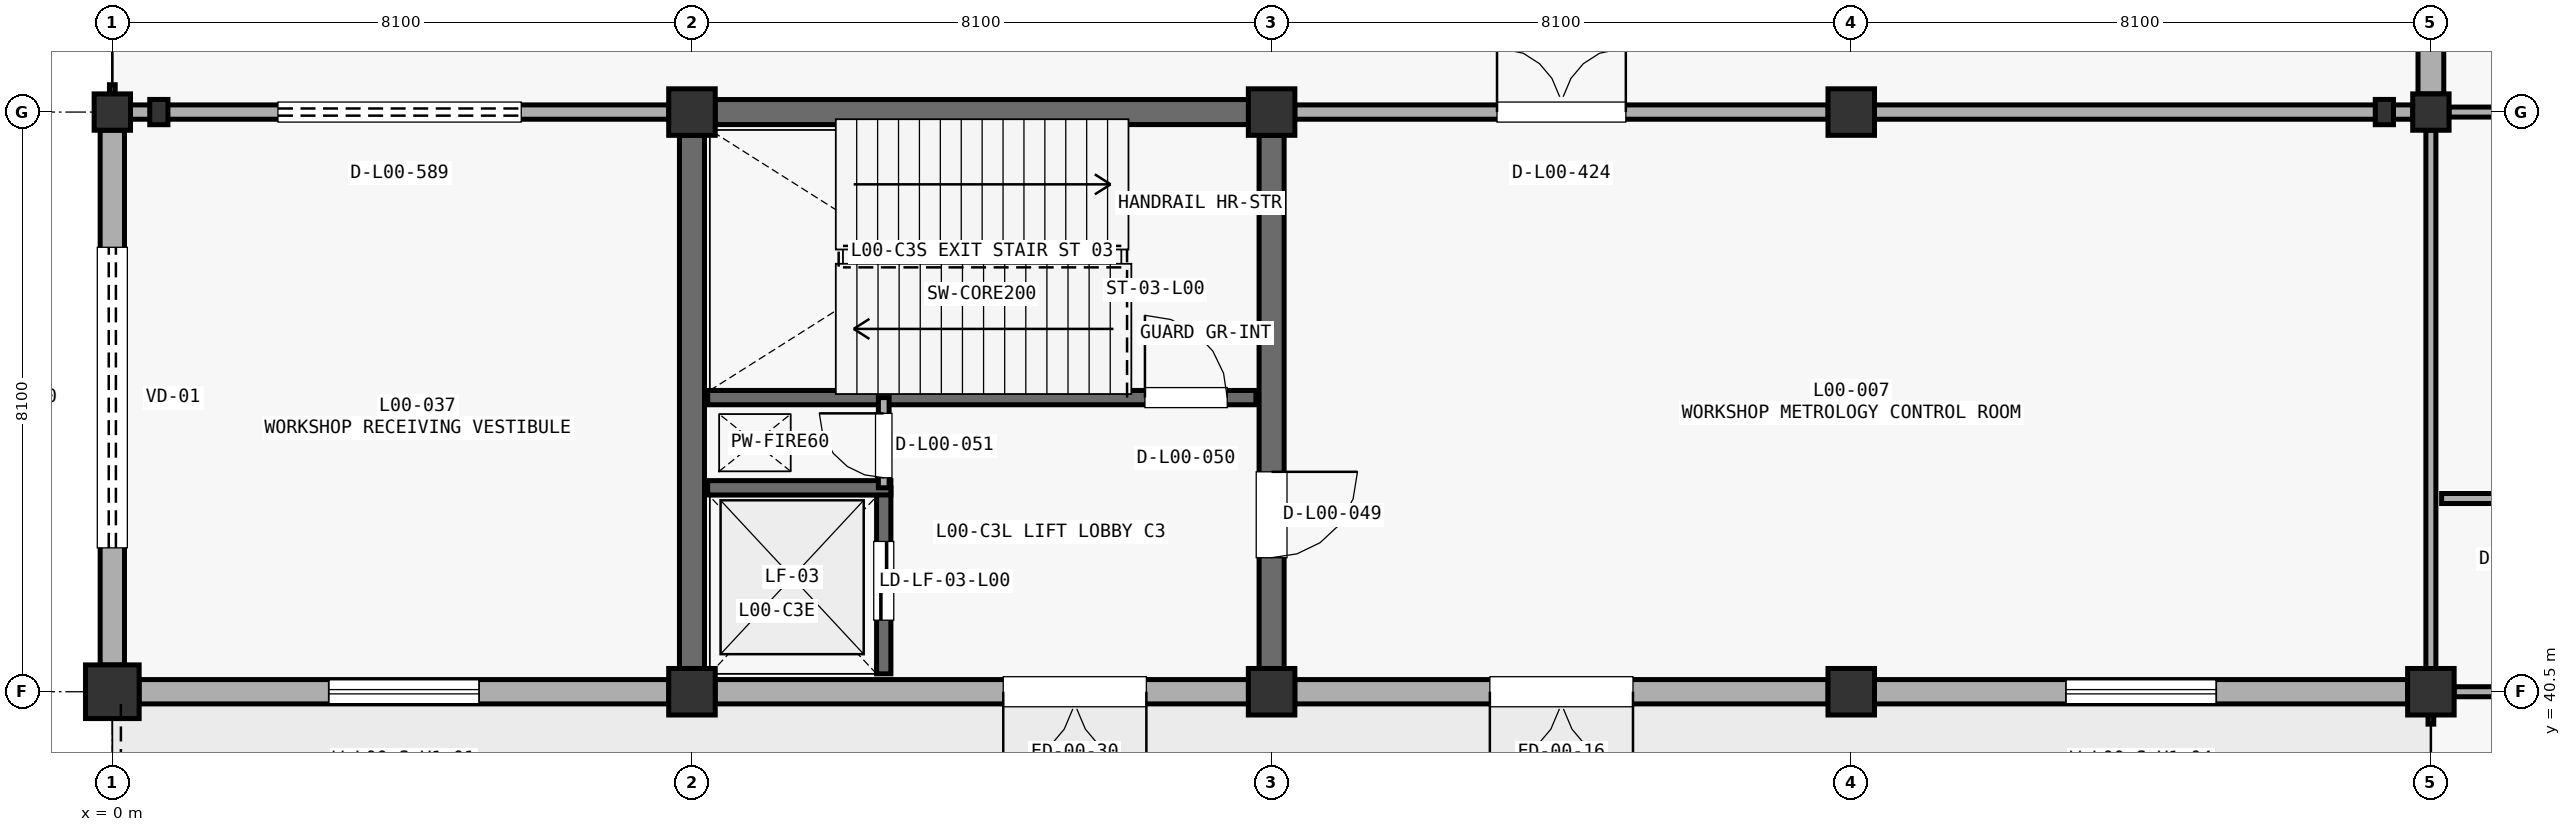
"""IFC4 building model, lengths in metres.
Left out: names, types, materials, properties, quantities, classifications, styles, units other than length and angle.
Written with IfcOpenShell. Run it as: python <this file> out.ifc"""

import sys

from ifc_helpers import new_model, si_unit, direction, frame, frame_2d, origin, origin_2d, place, context, subcontext, project, spatial, rectangle, circle, hollow_circle, i_section, extrude, element, fill, save


model = new_model("IFC4")
c1 = context("Model", 3, precision=1e-05, world=origin(), true_north=direction((0.0, 1.0)))
c2 = subcontext(c1, "Body", "Model", "MODEL_VIEW")
j1 = project(units=[si_unit("LENGTHUNIT", "METRE"), si_unit("PLANEANGLEUNIT", "RADIAN")], contexts=[c1])
p1 = place(None, origin())
s1 = spatial("IfcSite", under=j1, at=p1, CompositionType="ELEMENT")
p2 = place(p1, origin())
s2 = spatial("IfcBuilding", under=s1, at=p2, CompositionType="ELEMENT")
p3 = place(p2, origin())
s3 = spatial("IfcBuildingStorey", under=s2, at=p3, CompositionType="ELEMENT", Elevation=0.0)
p4 = place(p3, frame((0.0, 40.5, 0.0), z_axis=(0.0, 0.0, 1.0), x_axis=(1.0, 0.0, 0.0)))
e1 = element("IfcColumn", 1, at=p4, inside=s3, PredefinedType="COLUMN", context=c2, shape_type="SweptSolid", body=[
    extrude(circle(Radius=0.375, at=origin_2d()), origin(), (0.0, 0.0, 1.0), 5.1),
])
p5 = place(p3, frame((0.0, 48.6, 0.0), z_axis=(0.0, 0.0, 1.0), x_axis=(1.0, 0.0, 0.0)))
e2 = element("IfcColumn", 2, at=p5, inside=s3, PredefinedType="COLUMN", context=c2, shape_type="SweptSolid", body=[
    extrude(hollow_circle(Radius=0.254, WallThickness=0.019, at=origin_2d()), origin(), (0.0, 0.0, 1.0), 5.1),
])
for number, where, z_axis, x_axis in (
    (3, (8.1, 40.5, 0.0), (0.0, 0.0, 1.0), (1.0, 0.0, 0.0)),
    (4, (8.1, 48.6, 0.0), (0.0, 0.0, 1.0), (1.0, 0.0, 0.0)),
    (5, (16.2, 40.5, 0.0), (0.0, 0.0, 1.0), (1.0, 0.0, 0.0)),
    (6, (16.2, 48.6, 0.0), (0.0, 0.0, 1.0), (1.0, 0.0, 0.0)),
    (7, (24.3, 40.5, 0.0), (0.0, 0.0, 1.0), (1.0, 0.0, 0.0)),
    (8, (24.3, 48.6, 0.0), (0.0, 0.0, 1.0), (1.0, 0.0, 0.0)),
    (9, (32.4, 40.5, 0.0), (0.0, 0.0, 1.0), (1.0, 0.0, 0.0)),
):
    element("IfcColumn", number, at=place(p3, frame(where, z_axis=z_axis, x_axis=x_axis)), inside=s3, PredefinedType="COLUMN", context=c2, shape_type="SweptSolid", body=[
        extrude(rectangle(XDim=0.65, YDim=0.65, at=origin_2d()), origin(), (0.0, 0.0, 1.0), 5.1),
    ])
p6 = place(p3, frame((32.4, 48.6, 0.0), z_axis=(0.0, 0.0, 1.0), x_axis=(1.0, 0.0, 0.0)))
e10 = element("IfcColumn", 10, at=p6, inside=s3, PredefinedType="COLUMN", context=c2, shape_type="SweptSolid", body=[
    extrude(hollow_circle(Radius=0.254, WallThickness=0.019, at=origin_2d()), origin(), (0.0, 0.0, 1.0), 5.1),
])
for number, where, z_axis, x_axis in (
    (11, (0.65, 48.6, 0.0), (0.0, 0.0, 1.0), (1.0, 0.0, 0.0)),
    (12, (31.75, 48.6, 0.0), (0.0, 0.0, 1.0), (1.0, 0.0, 0.0)),
):
    element("IfcColumn", number, at=place(p3, frame(where, z_axis=z_axis, x_axis=x_axis)), inside=s3, PredefinedType="PILASTER", context=c2, shape_type="SweptSolid", body=[
        extrude(i_section(OverallWidth=0.254, OverallDepth=0.353, WebThickness=0.01, FlangeThickness=0.016, FilletRadius=0.016, at=origin_2d()), origin(), (0.0, 0.0, 1.0), 2.943),
    ])
p7 = place(p3, frame((0.0, 40.873, 0.0), z_axis=(0.0, 0.0, 1.0), x_axis=(0.0, 1.0, 0.0)))
e13 = element("IfcWall", 13, at=p7, inside=s3, PredefinedType="STANDARD", context=c2, shape_type="SweptSolid", body=[
    extrude(rectangle(XDim=7.475, YDim=0.34, at=frame_2d((3.737, 0.0))), origin(), (0.0, 0.0, 1.0), 4.516),
])
p8 = place(p7, frame((1.637, 0.0, 0.0)))
e14 = element("IfcOpeningElement", 14, at=p8, cuts=e13, PredefinedType="OPENING", context=c2, shape_type="SweptSolid", body=[
    extrude(rectangle(XDim=4.2, YDim=3.3, at=frame_2d((2.1, 1.65))), frame((0.0, 0.18, 0.0), z_axis=(0.0, -1.0, 0.0), x_axis=(1.0, 0.0, 0.0)), (0.0, 0.0, 1.0), 0.36),
])
p9 = place(p3, frame((0.373, 40.5, 0.0), z_axis=(0.0, 0.0, 1.0), x_axis=(1.0, 0.0, 0.0)))
e15 = element("IfcWall", 15, at=p9, inside=s3, PredefinedType="STANDARD", context=c2, shape_type="SweptSolid", body=[
    extrude(rectangle(XDim=7.404, YDim=0.34, at=frame_2d((3.702, 0.0))), origin(), (0.0, 0.0, 1.0), 4.516),
])
p10 = place(p9, frame((2.652, 0.0, 1.25)))
e16 = element("IfcOpeningElement", 16, at=p10, cuts=e15, PredefinedType="OPENING", context=c2, shape_type="SweptSolid", body=[
    extrude(rectangle(XDim=2.1, YDim=1.5, at=frame_2d((1.05, 0.75))), frame((0.0, 0.18, 0.0), z_axis=(0.0, -1.0, 0.0), x_axis=(1.0, 0.0, 0.0)), (0.0, 0.0, 1.0), 0.36),
])
p11 = place(p3, frame((8.423, 40.5, 0.0), z_axis=(0.0, 0.0, 1.0), x_axis=(1.0, 0.0, 0.0)))
e17 = element("IfcWall", 17, at=p11, inside=s3, PredefinedType="STANDARD", context=c2, shape_type="SweptSolid", body=[
    extrude(rectangle(XDim=7.454, YDim=0.34, at=frame_2d((3.727, 0.0))), origin(), (0.0, 0.0, 1.0), 4.407),
])
p12 = place(p11, frame((6.027, 0.0, 0.0), z_axis=(0.0, 0.0, 1.0), x_axis=(-1.0, 0.0, 0.0)))
e18 = element("IfcOpeningElement", 18, at=p12, cuts=e17, PredefinedType="OPENING", context=c2, shape_type="SweptSolid", body=[
    extrude(rectangle(XDim=2.0, YDim=2.2, at=frame_2d((1.0, 1.1))), frame((0.0, 0.18, 0.0), z_axis=(0.0, -1.0, 0.0), x_axis=(1.0, 0.0, 0.0)), (0.0, 0.0, 1.0), 0.36),
])
p13 = place(p3, frame((16.523, 40.5, 0.0), z_axis=(0.0, 0.0, 1.0), x_axis=(1.0, 0.0, 0.0)))
e19 = element("IfcWall", 19, at=p13, inside=s3, PredefinedType="STANDARD", context=c2, shape_type="SweptSolid", body=[
    extrude(rectangle(XDim=7.454, YDim=0.34, at=frame_2d((3.727, 0.0))), origin(), (0.0, 0.0, 1.0), 4.556),
])
p14 = place(p13, frame((4.727, 0.0, 0.0), z_axis=(0.0, 0.0, 1.0), x_axis=(-1.0, 0.0, 0.0)))
e20 = element("IfcOpeningElement", 20, at=p14, cuts=e19, PredefinedType="OPENING", context=c2, shape_type="SweptSolid", body=[
    extrude(rectangle(XDim=2.0, YDim=2.2, at=frame_2d((1.0, 1.1))), frame((0.0, 0.18, 0.0), z_axis=(0.0, -1.0, 0.0), x_axis=(1.0, 0.0, 0.0)), (0.0, 0.0, 1.0), 0.36),
])
p15 = place(p3, frame((24.623, 40.5, 0.0), z_axis=(0.0, 0.0, 1.0), x_axis=(1.0, 0.0, 0.0)))
e21 = element("IfcWall", 21, at=p15, inside=s3, PredefinedType="STANDARD", context=c2, shape_type="SweptSolid", body=[
    extrude(rectangle(XDim=7.454, YDim=0.34, at=frame_2d((3.727, 0.0))), origin(), (0.0, 0.0, 1.0), 4.466),
])
p16 = place(p15, frame((2.677, 0.0, 1.25)))
e22 = element("IfcOpeningElement", 22, at=p16, cuts=e21, PredefinedType="OPENING", context=c2, shape_type="SweptSolid", body=[
    extrude(rectangle(XDim=2.1, YDim=1.5, at=frame_2d((1.05, 0.75))), frame((0.0, 0.18, 0.0), z_axis=(0.0, -1.0, 0.0), x_axis=(1.0, 0.0, 0.0)), (0.0, 0.0, 1.0), 0.36),
])
p17 = place(p3, frame((32.4, 48.852, 0.0), z_axis=(0.0, 0.0, 1.0), x_axis=(0.0, 1.0, 0.0)))
e23 = element("IfcWall", 23, at=p17, inside=s3, PredefinedType="STANDARD", context=c2, shape_type="SweptSolid", body=[
    extrude(rectangle(XDim=7.673, YDim=0.36, at=frame_2d((3.837, 0.0))), origin(), (0.0, 0.0, 1.0), 4.289),
])
p18 = place(p17, frame((2.487, 0.0, 0.85)))
e24 = element("IfcOpeningElement", 24, at=p18, cuts=e23, PredefinedType="OPENING", context=c2, shape_type="SweptSolid", body=[
    extrude(rectangle(XDim=2.7, YDim=1.55, at=frame_2d((1.35, 0.775))), frame((0.0, 0.19, 0.0), z_axis=(0.0, -1.0, 0.0), x_axis=(1.0, 0.0, 0.0)), (0.0, 0.0, 1.0), 0.38),
])
p19 = place(p3, frame((8.423, 48.6, 0.0), z_axis=(0.0, 0.0, 1.0), x_axis=(1.0, 0.0, 0.0)))
e25 = element("IfcWall", 25, at=p19, inside=s3, PredefinedType="SHEAR", context=c2, shape_type="SweptSolid", body=[
    extrude(rectangle(XDim=7.454, YDim=0.35, at=frame_2d((3.727, 0.0))), origin(), (0.0, 0.0, 1.0), 4.822),
])
p20 = place(p3, frame((8.1, 40.823, 0.0), z_axis=(0.0, 0.0, 1.0), x_axis=(0.0, 1.0, 0.0)))
e26 = element("IfcWall", 26, at=p20, inside=s3, PredefinedType="SHEAR", context=c2, shape_type="SweptSolid", body=[
    extrude(rectangle(XDim=7.454, YDim=0.35, at=frame_2d((3.727, 0.0))), origin(), (0.0, 0.0, 1.0), 4.822),
])
p21 = place(p3, frame((16.2, 40.823, 0.0), z_axis=(0.0, 0.0, 1.0), x_axis=(0.0, 1.0, 0.0)))
e27 = element("IfcWall", 27, at=p21, inside=s3, PredefinedType="SHEAR", context=c2, shape_type="SweptSolid", body=[
    extrude(rectangle(XDim=7.454, YDim=0.35, at=frame_2d((3.727, 0.0))), origin(), (0.0, 0.0, 1.0), 4.822),
])
p22 = place(p21, frame((2.75, 0.0, 0.0), z_axis=(0.0, 0.0, 1.0), x_axis=(-1.0, 0.0, 0.0)))
e28 = element("IfcOpeningElement", 28, at=p22, cuts=e27, PredefinedType="OPENING", context=c2, shape_type="SweptSolid", body=[
    extrude(rectangle(XDim=1.2, YDim=2.2, at=frame_2d((0.6, 1.1))), frame((0.0, 0.185, 0.0), z_axis=(0.0, -1.0, 0.0), x_axis=(1.0, 0.0, 0.0)), (0.0, 0.0, 1.0), 0.37),
])
p23 = place(p3, frame((8.32, 44.61, 0.0), z_axis=(0.0, 0.0, 1.0), x_axis=(1.0, 0.0, 0.0)))
e29 = element("IfcWall", 29, at=p23, inside=s3, PredefinedType="SHEAR", context=c2, shape_type="SweptSolid", body=[
    extrude(rectangle(XDim=7.66, YDim=0.2, at=frame_2d((3.83, 0.0))), origin(), (0.0, 0.0, 1.0), 4.822),
])
p24 = place(p23, frame((6.11, 0.0, 0.0)))
e30 = element("IfcOpeningElement", 30, at=p24, cuts=e29, PredefinedType="OPENING", context=c2, shape_type="SweptSolid", body=[
    extrude(rectangle(XDim=1.15, YDim=2.2, at=frame_2d((0.575, 1.1))), frame((0.0, 0.11, 0.0), z_axis=(0.0, -1.0, 0.0), x_axis=(1.0, 0.0, 0.0)), (0.0, 0.0, 1.0), 0.22),
])
p25 = place(p3, frame((10.78, 40.75, 0.0), z_axis=(0.0, 0.0, 1.0), x_axis=(0.0, 1.0, 0.0)))
e31 = element("IfcWall", 31, at=p25, inside=s3, PredefinedType="SHEAR", context=c2, shape_type="SweptSolid", body=[
    extrude(rectangle(XDim=2.6, YDim=0.2, at=frame_2d((1.3, 0.0))), origin(), (0.0, 0.0, 1.0), 4.822),
])
p26 = place(p25, frame((0.75, 0.0, 0.0)))
e32 = element("IfcOpeningElement", 32, at=p26, cuts=e31, PredefinedType="OPENING", context=c2, shape_type="SweptSolid", body=[
    extrude(rectangle(XDim=1.1, YDim=2.2, at=frame_2d((0.55, 1.1))), frame((0.0, 0.11, 0.0), z_axis=(0.0, -1.0, 0.0), x_axis=(1.0, 0.0, 0.0)), (0.0, 0.0, 1.0), 0.22),
])
p27 = place(p3, frame((8.32, 43.35, 0.0), z_axis=(0.0, 0.0, 1.0), x_axis=(1.0, 0.0, 0.0)))
e33 = element("IfcWall", 33, at=p27, inside=s3, PredefinedType="SHEAR", context=c2, shape_type="SweptSolid", body=[
    extrude(rectangle(XDim=2.56, YDim=0.2, at=frame_2d((1.28, 0.0))), origin(), (0.0, 0.0, 1.0), 4.822),
])
p28 = place(p3, frame((10.78, 43.35, 0.0), z_axis=(0.0, 0.0, 1.0), x_axis=(0.0, 1.0, 0.0)))
e34 = element("IfcWall", 34, at=p28, inside=s3, PredefinedType="PARTITIONING", context=c2, shape_type="SweptSolid", body=[
    extrude(rectangle(XDim=1.26, YDim=0.15, at=frame_2d((0.63, 0.0))), origin(), (0.0, 0.0, 1.0), 4.822),
])
p29 = place(p28, frame((0.14, 0.0, 0.0)))
e35 = element("IfcOpeningElement", 35, at=p29, cuts=e34, PredefinedType="OPENING", context=c2, shape_type="SweptSolid", body=[
    extrude(rectangle(XDim=0.9, YDim=2.15, at=frame_2d((0.45, 1.075))), frame((0.0, 0.085, 0.0), z_axis=(0.0, -1.0, 0.0), x_axis=(1.0, 0.0, 0.0)), (0.0, 0.0, 1.0), 0.17),
])
p30 = place(p3, frame((32.723, 40.5, 0.0), z_axis=(0.0, 0.0, 1.0), x_axis=(1.0, 0.0, 0.0)))
e36 = element("IfcWall", 36, at=p30, inside=s3, PredefinedType="PARTITIONING", context=c2, shape_type="SweptSolid", body=[
    extrude(rectangle(XDim=7.404, YDim=0.14, at=frame_2d((3.702, 0.0))), origin(), (0.0, 0.0, 1.0), 4.271),
])
p31 = place(p30, frame((3.242, 0.0, 0.0)))
e37 = element("IfcOpeningElement", 37, at=p31, cuts=e36, PredefinedType="OPENING", context=c2, shape_type="SweptSolid", body=[
    extrude(rectangle(XDim=0.92, YDim=2.15, at=frame_2d((0.46, 1.075))), frame((0.0, 0.08, 0.0), z_axis=(0.0, -1.0, 0.0), x_axis=(1.0, 0.0, 0.0)), (0.0, 0.0, 1.0), 0.16),
])
p32 = place(p3, frame((32.652, 48.6, 0.0), z_axis=(0.0, 0.0, 1.0), x_axis=(1.0, 0.0, 0.0)))
e38 = element("IfcWall", 38, at=p32, inside=s3, PredefinedType="PARTITIONING", context=c2, shape_type="SweptSolid", body=[
    extrude(rectangle(XDim=7.525, YDim=0.14, at=frame_2d((3.762, 0.0))), origin(), (0.0, 0.0, 1.0), 4.287),
])
p33 = place(p3, frame((32.4, 40.823, 0.0), z_axis=(0.0, 0.0, 1.0), x_axis=(0.0, 1.0, 0.0)))
e39 = element("IfcWall", 39, at=p33, inside=s3, PredefinedType="PARTITIONING", context=c2, shape_type="SweptSolid", body=[
    extrude(rectangle(XDim=7.525, YDim=0.14, at=frame_2d((3.762, 0.0))), origin(), (0.0, 0.0, 1.0), 4.271),
])
p34 = place(p3, frame((32.55, 43.2, 0.0), z_axis=(0.0, 0.0, 1.0), x_axis=(1.0, 0.0, 0.0)))
e40 = element("IfcWall", 40, at=p34, inside=s3, PredefinedType="PARTITIONING", context=c2, shape_type="SweptSolid", body=[
    extrude(rectangle(XDim=7.8, YDim=0.14, at=frame_2d((3.9, 0.0))), origin(), (0.0, 0.0, 1.0), 4.822),
])
p35 = place(p34, frame((0.75, 0.0, 0.0)))
e41 = element("IfcOpeningElement", 41, at=p35, cuts=e40, PredefinedType="OPENING", context=c2, shape_type="SweptSolid", body=[
    extrude(rectangle(XDim=0.92, YDim=2.15, at=frame_2d((0.46, 1.075))), frame((0.0, 0.08, 0.0), z_axis=(0.0, -1.0, 0.0), x_axis=(1.0, 0.0, 0.0)), (0.0, 0.0, 1.0), 0.16),
])
p36 = place(p34, frame((3.44, 0.0, 0.0)))
e42 = element("IfcOpeningElement", 42, at=p36, cuts=e40, PredefinedType="OPENING", context=c2, shape_type="SweptSolid", body=[
    extrude(rectangle(XDim=0.92, YDim=2.15, at=frame_2d((0.46, 1.075))), frame((0.0, 0.08, 0.0), z_axis=(0.0, -1.0, 0.0), x_axis=(1.0, 0.0, 0.0)), (0.0, 0.0, 1.0), 0.16),
])
p37 = place(p34, frame((6.05, 0.0, 0.0)))
e43 = element("IfcOpeningElement", 43, at=p37, cuts=e40, PredefinedType="OPENING", context=c2, shape_type="SweptSolid", body=[
    extrude(rectangle(XDim=1.0, YDim=2.15, at=frame_2d((0.5, 1.075))), frame((0.0, 0.08, 0.0), z_axis=(0.0, -1.0, 0.0), x_axis=(1.0, 0.0, 0.0)), (0.0, 0.0, 1.0), 0.16),
])
p38 = place(p3, frame((0.252, 48.6, 0.0), z_axis=(0.0, 0.0, 1.0), x_axis=(1.0, 0.0, 0.0)))
e44 = element("IfcWall", 44, at=p38, inside=s3, PredefinedType="PARTITIONING", context=c2, shape_type="SweptSolid", body=[
    extrude(rectangle(XDim=7.525, YDim=0.2, at=frame_2d((3.763, 0.0))), origin(), (0.0, 0.0, 1.0), 4.505),
])
p39 = place(p38, frame((2.062, 0.0, 0.0)))
e45 = element("IfcOpeningElement", 45, at=p39, cuts=e44, PredefinedType="OPENING", context=c2, shape_type="SweptSolid", body=[
    extrude(rectangle(XDim=3.4, YDim=2.9, at=frame_2d((1.7, 1.45))), frame((0.0, 0.11, 0.0), z_axis=(0.0, -1.0, 0.0), x_axis=(1.0, 0.0, 0.0)), (0.0, 0.0, 1.0), 0.22),
])
p40 = place(p3, frame((16.523, 48.6, 0.0), z_axis=(0.0, 0.0, 1.0), x_axis=(1.0, 0.0, 0.0)))
e46 = element("IfcWall", 46, at=p40, inside=s3, PredefinedType="PARTITIONING", context=c2, shape_type="SweptSolid", body=[
    extrude(rectangle(XDim=7.454, YDim=0.2, at=frame_2d((3.727, 0.0))), origin(), (0.0, 0.0, 1.0), 4.466),
])
p41 = place(p40, frame((2.827, 0.0, 0.0)))
e47 = element("IfcOpeningElement", 47, at=p41, cuts=e46, PredefinedType="OPENING", context=c2, shape_type="SweptSolid", body=[
    extrude(rectangle(XDim=1.8, YDim=2.4, at=frame_2d((0.9, 1.2))), frame((0.0, 0.11, 0.0), z_axis=(0.0, -1.0, 0.0), x_axis=(1.0, 0.0, 0.0)), (0.0, 0.0, 1.0), 0.22),
])
p42 = place(p3, frame((24.623, 48.6, 0.0), z_axis=(0.0, 0.0, 1.0), x_axis=(1.0, 0.0, 0.0)))
e48 = element("IfcWall", 48, at=p42, inside=s3, PredefinedType="PARTITIONING", context=c2, shape_type="SweptSolid", body=[
    extrude(rectangle(XDim=7.525, YDim=0.2, at=frame_2d((3.762, 0.0))), origin(), (0.0, 0.0, 1.0), 4.407),
])
p43 = place(p8, origin())
e49 = element("IfcDoor", 49, at=p43, inside=s3, OperationType="ROLLINGUP", PredefinedType="GATE", context=c2, shape_type="SweptSolid", body=[
    extrude(rectangle(XDim=4.2, YDim=3.3, at=frame_2d((2.1, 1.65))), frame((0.0, 0.025, 0.0), z_axis=(0.0, -1.0, 0.0), x_axis=(1.0, 0.0, 0.0)), (0.0, 0.0, 1.0), 0.05),
])
fill(e14, e49)
p44 = place(p10, origin())
e50 = element("IfcWindow", 50, at=p44, inside=s3, PartitioningType="SINGLE_PANEL", PredefinedType="WINDOW", context=c2, shape_type="SweptSolid", body=[
    extrude(rectangle(XDim=2.1, YDim=1.5, at=frame_2d((1.05, 0.75))), frame((0.0, 0.03, 0.0), z_axis=(0.0, -1.0, 0.0), x_axis=(1.0, 0.0, 0.0)), (0.0, 0.0, 1.0), 0.06),
])
fill(e16, e50)
p45 = place(p12, origin())
e51 = element("IfcDoor", 51, at=p45, inside=s3, OperationType="DOUBLE_SWING_LEFT", PredefinedType="DOOR", context=c2, shape_type="SweptSolid", body=[
    extrude(rectangle(XDim=2.0, YDim=2.2, at=frame_2d((1.0, 1.1))), frame((0.0, 0.025, 0.0), z_axis=(0.0, -1.0, 0.0), x_axis=(1.0, 0.0, 0.0)), (0.0, 0.0, 1.0), 0.05),
])
fill(e18, e51)
p46 = place(p14, origin())
e52 = element("IfcDoor", 52, at=p46, inside=s3, OperationType="DOUBLE_SWING_LEFT", PredefinedType="DOOR", context=c2, shape_type="SweptSolid", body=[
    extrude(rectangle(XDim=2.0, YDim=2.2, at=frame_2d((1.0, 1.1))), frame((0.0, 0.025, 0.0), z_axis=(0.0, -1.0, 0.0), x_axis=(1.0, 0.0, 0.0)), (0.0, 0.0, 1.0), 0.05),
])
fill(e20, e52)
p47 = place(p16, origin())
e53 = element("IfcWindow", 53, at=p47, inside=s3, PartitioningType="SINGLE_PANEL", PredefinedType="WINDOW", context=c2, shape_type="SweptSolid", body=[
    extrude(rectangle(XDim=2.1, YDim=1.5, at=frame_2d((1.05, 0.75))), frame((0.0, 0.03, 0.0), z_axis=(0.0, -1.0, 0.0), x_axis=(1.0, 0.0, 0.0)), (0.0, 0.0, 1.0), 0.06),
])
fill(e22, e53)
p48 = place(p22, origin())
e54 = element("IfcDoor", 54, at=p48, inside=s3, OperationType="SINGLE_SWING_RIGHT", PredefinedType="DOOR", context=c2, shape_type="SweptSolid", body=[
    extrude(rectangle(XDim=1.2, YDim=2.2, at=frame_2d((0.6, 1.1))), frame((0.0, 0.025, 0.0), z_axis=(0.0, -1.0, 0.0), x_axis=(1.0, 0.0, 0.0)), (0.0, 0.0, 1.0), 0.05),
])
fill(e28, e54)
p49 = place(p24, origin())
e55 = element("IfcDoor", 55, at=p49, inside=s3, OperationType="SINGLE_SWING_LEFT", PredefinedType="DOOR", context=c2, shape_type="SweptSolid", body=[
    extrude(rectangle(XDim=1.15, YDim=2.2, at=frame_2d((0.575, 1.1))), frame((0.0, 0.025, 0.0), z_axis=(0.0, -1.0, 0.0), x_axis=(1.0, 0.0, 0.0)), (0.0, 0.0, 1.0), 0.05),
])
fill(e30, e55)
p50 = place(p26, origin())
e56 = element("IfcDoor", 56, at=p50, inside=s3, OperationType="SLIDING_TO_LEFT", PredefinedType="DOOR", context=c2, shape_type="SweptSolid", body=[
    extrude(rectangle(XDim=1.1, YDim=2.2, at=frame_2d((0.55, 1.1))), frame((0.0, 0.025, 0.0), z_axis=(0.0, -1.0, 0.0), x_axis=(1.0, 0.0, 0.0)), (0.0, 0.0, 1.0), 0.05),
])
fill(e32, e56)
p51 = place(p29, origin())
e57 = element("IfcDoor", 57, at=p51, inside=s3, OperationType="SINGLE_SWING_RIGHT", PredefinedType="DOOR", context=c2, shape_type="SweptSolid", body=[
    extrude(rectangle(XDim=0.9, YDim=2.15, at=frame_2d((0.45, 1.075))), frame((0.0, 0.025, 0.0), z_axis=(0.0, -1.0, 0.0), x_axis=(1.0, 0.0, 0.0)), (0.0, 0.0, 1.0), 0.05),
])
fill(e35, e57)
p52 = place(p41, origin())
e58 = element("IfcDoor", 58, at=p52, inside=s3, OperationType="DOUBLE_SWING_LEFT", PredefinedType="DOOR", context=c2, shape_type="SweptSolid", body=[
    extrude(rectangle(XDim=1.8, YDim=2.4, at=frame_2d((0.9, 1.2))), frame((0.0, 0.025, 0.0), z_axis=(0.0, -1.0, 0.0), x_axis=(1.0, 0.0, 0.0)), (0.0, 0.0, 1.0), 0.05),
])
fill(e47, e58)
p53 = place(p39, origin())
e59 = element("IfcDoor", 59, at=p53, inside=s3, OperationType="ROLLINGUP", PredefinedType="GATE", context=c2, shape_type="SweptSolid", body=[
    extrude(rectangle(XDim=3.4, YDim=2.9, at=frame_2d((1.7, 1.45))), frame((0.0, 0.025, 0.0), z_axis=(0.0, -1.0, 0.0), x_axis=(1.0, 0.0, 0.0)), (0.0, 0.0, 1.0), 0.05),
])
fill(e45, e59)
save(model, sys.argv[1])
